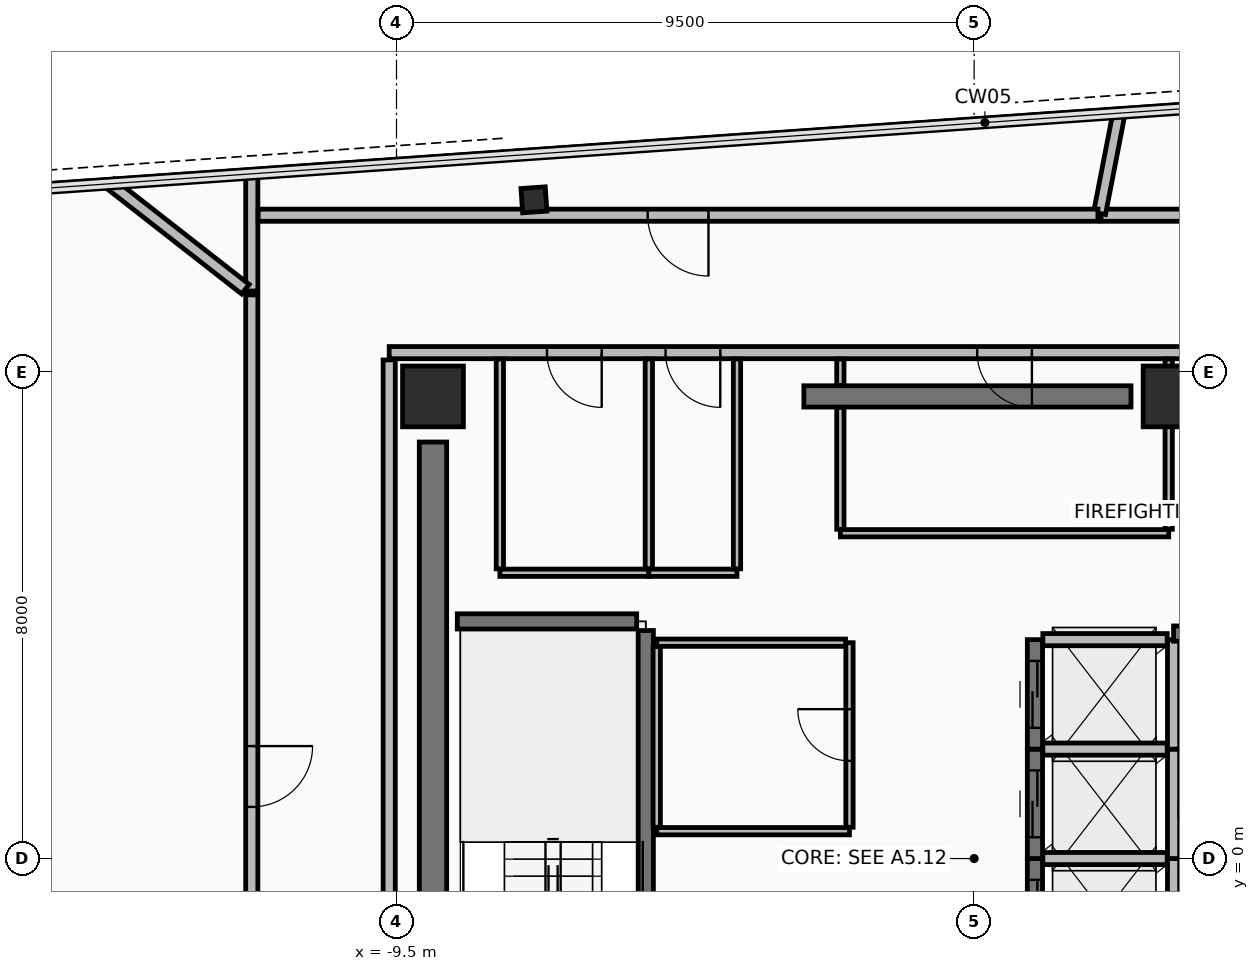
"""IFC4 building model, lengths in metres.
Left out: names, types, materials, properties, quantities, classifications, styles, units other than length and angle.
Written with IfcOpenShell. Run it as: python <this file> out.ifc"""

import sys

from ifc_helpers import new_model, si_unit, direction, frame, frame_2d, origin, origin_2d, place, context, subcontext, project, spatial, rectangle, hollow_rectangle, extrude, element, fill, save


model = new_model("IFC4")
c1 = context("Model", 3, precision=1e-05, world=origin(), true_north=direction((0.0, 1.0)))
c2 = subcontext(c1, "Body", "Model", "MODEL_VIEW")
j1 = project(units=[si_unit("LENGTHUNIT", "METRE"), si_unit("PLANEANGLEUNIT", "RADIAN")], contexts=[c1])
p1 = place(None, origin())
s1 = spatial("IfcSite", under=j1, at=p1, CompositionType="ELEMENT")
p2 = place(p1, origin())
s2 = spatial("IfcBuilding", under=s1, at=p2, CompositionType="ELEMENT")
p3 = place(p2, frame((0.0, 0.0, 267.8)))
s3 = spatial("IfcBuildingStorey", under=s2, at=p3, CompositionType="ELEMENT", Elevation=267.8)
for number, where, z_axis, x_axis in (
    (1, (3.28, 7.6, 0.0), (0.0, 0.0, 1.0), (1.0, 0.0, 0.0)),
    (2, (-8.9, 7.6, 0.0), (0.0, 0.0, 1.0), (1.0, 0.0, 0.0)),
):
    element("IfcColumn", number, at=place(p3, frame(where, z_axis=z_axis, x_axis=x_axis)), inside=s3, PredefinedType="COLUMN", context=c2, shape_type="SweptSolid", body=[
        extrude(rectangle(XDim=1.0, YDim=1.0, at=origin_2d()), origin(), (0.0, 0.0, 1.0), 3.6),
    ])
p4 = place(p3, frame((-7.24, 10.833, 0.0), z_axis=(0.0, 0.0, 1.0), x_axis=(0.99756392851, 0.069758214822, 0.0)))
e3 = element("IfcColumn", 3, at=p4, inside=s3, PredefinedType="COLUMN", context=c2, shape_type="SweptSolid", body=[
    extrude(hollow_rectangle(XDim=0.4, YDim=0.4, WallThickness=0.025, at=origin_2d()), origin(), (0.0, 0.0, 1.0), 3.6),
])
p5 = place(p3, frame((-2.8, 7.6, 0.0), z_axis=(0.0, 0.0, 1.0), x_axis=(1.0, 0.0, 0.0)))
e4 = element("IfcWall", 4, at=p5, inside=s3, PredefinedType="SHEAR", context=c2, shape_type="SweptSolid", body=[
    extrude(rectangle(XDim=5.38, YDim=0.35, at=frame_2d((2.69, 0.0))), origin(), (0.0, 0.0, 1.0), 3.42),
])
p6 = place(p3, frame((-8.9, -3.85, 0.0), z_axis=(0.0, 0.0, 1.0), x_axis=(0.0, 1.0, 0.0)))
e5 = element("IfcWall", 5, at=p6, inside=s3, PredefinedType="SHEAR", context=c2, shape_type="SweptSolid", body=[
    extrude(rectangle(XDim=10.7, YDim=0.45, at=frame_2d((5.35, 0.0))), origin(), (0.0, 0.0, 1.0), 3.42),
])
p7 = place(p3, frame((9.62, 8.32, 0.0), z_axis=(0.0, 0.0, 1.0), x_axis=(-1.0, 0.0, 0.0)))
e6 = element("IfcWall", 6, at=p7, inside=s3, PredefinedType="PARTITIONING", context=c2, shape_type="SweptSolid", body=[
    extrude(rectangle(XDim=19.24, YDim=0.2, at=frame_2d((9.62, 0.0))), origin(), (0.0, 0.0, 1.0), 2.915),
])
p8 = place(p7, frame((8.67, 0.0, 0.0)))
e7 = element("IfcOpeningElement", 7, at=p8, cuts=e6, PredefinedType="OPENING", context=c2, shape_type="SweptSolid", body=[
    extrude(rectangle(XDim=0.9, YDim=2.1, at=frame_2d((0.45, 1.05))), frame((0.0, 0.11, 0.0), z_axis=(0.0, -1.0, 0.0), x_axis=(1.0, 0.0, 0.0)), (0.0, 0.0, 1.0), 0.22),
])
p9 = place(p7, frame((15.745, 0.0, 0.0)))
e8 = element("IfcOpeningElement", 8, at=p9, cuts=e6, PredefinedType="OPENING", context=c2, shape_type="SweptSolid", body=[
    extrude(rectangle(XDim=0.9, YDim=2.1, at=frame_2d((0.45, 1.05))), frame((0.0, 0.11, 0.0), z_axis=(0.0, -1.0, 0.0), x_axis=(1.0, 0.0, 0.0)), (0.0, 0.0, 1.0), 0.22),
])
p10 = place(p7, frame((13.795, 0.0, 0.0)))
e9 = element("IfcOpeningElement", 9, at=p10, cuts=e6, PredefinedType="OPENING", context=c2, shape_type="SweptSolid", body=[
    extrude(rectangle(XDim=0.9, YDim=2.1, at=frame_2d((0.45, 1.05))), frame((0.0, 0.11, 0.0), z_axis=(0.0, -1.0, 0.0), x_axis=(1.0, 0.0, 0.0)), (0.0, 0.0, 1.0), 0.22),
])
p11 = place(p3, frame((-9.62, 8.2, 0.0), z_axis=(0.0, 0.0, 1.0), x_axis=(0.0, -1.0, 0.0)))
e10 = element("IfcWall", 10, at=p11, inside=s3, PredefinedType="PARTITIONING", context=c2, shape_type="SweptSolid", body=[
    extrude(rectangle(XDim=16.4, YDim=0.2, at=frame_2d((8.2, 0.0))), origin(), (0.0, 0.0, 1.0), 2.765),
])
p12 = place(p11, frame((12.65, 0.0, 0.0)))
e11 = element("IfcOpeningElement", 11, at=p12, cuts=e10, PredefinedType="OPENING", context=c2, shape_type="SweptSolid", body=[
    extrude(rectangle(XDim=1.1, YDim=2.15, at=frame_2d((0.55, 1.075))), frame((0.0, 0.11, 0.0), z_axis=(0.0, -1.0, 0.0), x_axis=(1.0, 0.0, 0.0)), (0.0, 0.0, 1.0), 0.22),
])
p13 = place(p3, frame((-5.4, -3.55, 0.0), z_axis=(0.0, 0.0, 1.0), x_axis=(0.0, 1.0, 0.0)))
e12 = element("IfcWall", 12, at=p13, inside=s3, PredefinedType="SHEAR", context=c2, shape_type="SweptSolid", body=[
    extrude(rectangle(XDim=7.3, YDim=0.25, at=frame_2d((3.65, 0.0))), origin(), (0.0, 0.0, 1.0), 3.42),
])
p14 = place(p3, frame((-8.5, 3.9, 0.0), z_axis=(0.0, 0.0, 1.0), x_axis=(1.0, 0.0, 0.0)))
e13 = element("IfcWall", 13, at=p14, inside=s3, PredefinedType="SHEAR", context=c2, shape_type="SweptSolid", body=[
    extrude(rectangle(XDim=2.95, YDim=0.25, at=frame_2d((1.475, 0.0))), origin(), (0.0, 0.0, 1.0), 3.42),
])
p15 = place(p3, frame((1.0, -1.8, 0.0), z_axis=(0.0, 0.0, 1.0), x_axis=(0.0, 1.0, 0.0)))
e14 = element("IfcWall", 14, at=p15, inside=s3, PredefinedType="SHEAR", context=c2, shape_type="SweptSolid", body=[
    extrude(rectangle(XDim=1.8, YDim=0.25, at=frame_2d((0.9, 0.0))), origin(), (0.0, 0.0, 1.0), 3.42),
])
p16 = place(p15, frame((0.35, 0.0, 0.0)))
e15 = element("IfcOpeningElement", 15, at=p16, cuts=e14, PredefinedType="OPENING", context=c2, shape_type="SweptSolid", body=[
    extrude(rectangle(XDim=1.1, YDim=2.2, at=frame_2d((0.55, 1.1))), frame((0.0, 0.135, 0.0), z_axis=(0.0, -1.0, 0.0), x_axis=(1.0, 0.0, 0.0)), (0.0, 0.0, 1.0), 0.27),
])
p17 = place(p3, frame((3.28, -1.8, 0.0), z_axis=(0.0, 0.0, 1.0), x_axis=(0.0, 1.0, 0.0)))
e16 = element("IfcWall", 16, at=p17, inside=s3, PredefinedType="PARTITIONING", context=c2, shape_type="SweptSolid", body=[
    extrude(rectangle(XDim=1.8, YDim=0.2, at=frame_2d((0.9, 0.0))), origin(), (0.0, 0.0, 1.0), 3.42),
])
p18 = place(p3, frame((1.13, 0.0, 0.0), z_axis=(0.0, 0.0, 1.0), x_axis=(1.0, 0.0, 0.0)))
e17 = element("IfcWall", 17, at=p18, inside=s3, PredefinedType="PARTITIONING", context=c2, shape_type="SweptSolid", body=[
    extrude(rectangle(XDim=2.045, YDim=0.2, at=frame_2d((1.022, 0.0))), origin(), (0.0, 0.0, 1.0), 3.42),
])
p19 = place(p3, frame((1.0, 0.0, 0.0), z_axis=(0.0, 0.0, 1.0), x_axis=(0.0, 1.0, 0.0)))
e18 = element("IfcWall", 18, at=p19, inside=s3, PredefinedType="SHEAR", context=c2, shape_type="SweptSolid", body=[
    extrude(rectangle(XDim=1.8, YDim=0.25, at=frame_2d((0.9, 0.0))), origin(), (0.0, 0.0, 1.0), 3.42),
])
p20 = place(p19, frame((0.35, 0.0, 0.0)))
e19 = element("IfcOpeningElement", 19, at=p20, cuts=e18, PredefinedType="OPENING", context=c2, shape_type="SweptSolid", body=[
    extrude(rectangle(XDim=1.1, YDim=2.2, at=frame_2d((0.55, 1.1))), frame((0.0, 0.135, 0.0), z_axis=(0.0, -1.0, 0.0), x_axis=(1.0, 0.0, 0.0)), (0.0, 0.0, 1.0), 0.27),
])
p21 = place(p3, frame((3.28, 0.0, 0.0), z_axis=(0.0, 0.0, 1.0), x_axis=(0.0, 1.0, 0.0)))
e20 = element("IfcWall", 20, at=p21, inside=s3, PredefinedType="PARTITIONING", context=c2, shape_type="SweptSolid", body=[
    extrude(rectangle(XDim=1.8, YDim=0.2, at=frame_2d((0.9, 0.0))), origin(), (0.0, 0.0, 1.0), 3.42),
])
p22 = place(p3, frame((1.13, 1.8, 0.0), z_axis=(0.0, 0.0, 1.0), x_axis=(1.0, 0.0, 0.0)))
e21 = element("IfcWall", 21, at=p22, inside=s3, PredefinedType="PARTITIONING", context=c2, shape_type="SweptSolid", body=[
    extrude(rectangle(XDim=2.045, YDim=0.2, at=frame_2d((1.022, 0.0))), origin(), (0.0, 0.0, 1.0), 3.42),
])
p23 = place(p3, frame((1.0, 1.8, 0.0), z_axis=(0.0, 0.0, 1.0), x_axis=(0.0, 1.0, 0.0)))
e22 = element("IfcWall", 22, at=p23, inside=s3, PredefinedType="SHEAR", context=c2, shape_type="SweptSolid", body=[
    extrude(rectangle(XDim=1.8, YDim=0.25, at=frame_2d((0.9, 0.0))), origin(), (0.0, 0.0, 1.0), 3.42),
])
p24 = place(p23, frame((0.35, 0.0, 0.0)))
e23 = element("IfcOpeningElement", 23, at=p24, cuts=e22, PredefinedType="OPENING", context=c2, shape_type="SweptSolid", body=[
    extrude(rectangle(XDim=1.1, YDim=2.2, at=frame_2d((0.55, 1.1))), frame((0.0, 0.135, 0.0), z_axis=(0.0, -1.0, 0.0), x_axis=(1.0, 0.0, 0.0)), (0.0, 0.0, 1.0), 0.27),
])
p25 = place(p3, frame((3.28, 1.8, 0.0), z_axis=(0.0, 0.0, 1.0), x_axis=(0.0, 1.0, 0.0)))
e24 = element("IfcWall", 24, at=p25, inside=s3, PredefinedType="PARTITIONING", context=c2, shape_type="SweptSolid", body=[
    extrude(rectangle(XDim=1.8, YDim=0.2, at=frame_2d((0.9, 0.0))), origin(), (0.0, 0.0, 1.0), 3.42),
])
p26 = place(p3, frame((1.13, 3.6, 0.0), z_axis=(0.0, 0.0, 1.0), x_axis=(1.0, 0.0, 0.0)))
e25 = element("IfcWall", 25, at=p26, inside=s3, PredefinedType="PARTITIONING", context=c2, shape_type="SweptSolid", body=[
    extrude(rectangle(XDim=2.045, YDim=0.2, at=frame_2d((1.022, 0.0))), origin(), (0.0, 0.0, 1.0), 2.715),
])
p27 = place(p3, frame((3.28, 3.7, 0.0), z_axis=(0.0, 0.0, 1.0), x_axis=(1.0, 0.0, 0.0)))
e26 = element("IfcWall", 26, at=p27, inside=s3, PredefinedType="SHEAR", context=c2, shape_type="SweptSolid", body=[
    extrude(rectangle(XDim=2.07, YDim=0.25, at=frame_2d((1.035, 0.0))), origin(), (0.0, 0.0, 1.0), 3.42),
])
p28 = place(p27, frame((0.435, 0.0, 0.0)))
e27 = element("IfcOpeningElement", 27, at=p28, cuts=e26, PredefinedType="OPENING", context=c2, shape_type="SweptSolid", body=[
    extrude(rectangle(XDim=1.2, YDim=2.2, at=frame_2d((0.6, 1.1))), frame((0.0, 0.135, 0.0), z_axis=(0.0, -1.0, 0.0), x_axis=(1.0, 0.0, 0.0)), (0.0, 0.0, 1.0), 0.27),
])
p29 = place(p3, frame((-5.22, 0.45, 0.0), z_axis=(0.0, 0.0, 1.0), x_axis=(1.0, 0.0, 0.0)))
e28 = element("IfcWall", 28, at=p29, inside=s3, PredefinedType="PARTITIONING", context=c2, shape_type="SweptSolid", body=[
    extrude(rectangle(XDim=3.17, YDim=0.12, at=frame_2d((1.585, 0.0))), origin(), (0.0, 0.0, 1.0), 3.42),
])
p30 = place(p3, frame((-2.05, 0.515, 0.0), z_axis=(0.0, 0.0, 1.0), x_axis=(0.0, 1.0, 0.0)))
e29 = element("IfcWall", 29, at=p30, inside=s3, PredefinedType="PARTITIONING", context=c2, shape_type="SweptSolid", body=[
    extrude(rectangle(XDim=3.035, YDim=0.12, at=frame_2d((1.518, 0.0))), origin(), (0.0, 0.0, 1.0), 3.42),
])
p31 = place(p30, frame((1.092, 0.0, 0.0)))
e30 = element("IfcOpeningElement", 30, at=p31, cuts=e29, PredefinedType="OPENING", context=c2, shape_type="SweptSolid", body=[
    extrude(rectangle(XDim=0.85, YDim=2.1, at=frame_2d((0.425, 1.05))), frame((0.0, 0.07, 0.0), z_axis=(0.0, -1.0, 0.0), x_axis=(1.0, 0.0, 0.0)), (0.0, 0.0, 1.0), 0.14),
])
p32 = place(p3, frame((-2.115, 3.55, 0.0), z_axis=(0.0, 0.0, 1.0), x_axis=(-1.0, 0.0, 0.0)))
e31 = element("IfcWall", 31, at=p32, inside=s3, PredefinedType="PARTITIONING", context=c2, shape_type="SweptSolid", body=[
    extrude(rectangle(XDim=3.105, YDim=0.12, at=frame_2d((1.552, 0.0))), origin(), (0.0, 0.0, 1.0), 3.42),
])
p33 = place(p3, frame((-5.22, 3.485, 0.0), z_axis=(0.0, 0.0, 1.0), x_axis=(0.0, -1.0, 0.0)))
e32 = element("IfcWall", 32, at=p33, inside=s3, PredefinedType="PARTITIONING", context=c2, shape_type="SweptSolid", body=[
    extrude(rectangle(XDim=2.97, YDim=0.12, at=frame_2d((1.485, 0.0))), origin(), (0.0, 0.0, 1.0), 3.42),
])
p34 = place(p3, frame((-2.2, 5.35, 0.0), z_axis=(0.0, 0.0, 1.0), x_axis=(1.0, 0.0, 0.0)))
e33 = element("IfcWall", 33, at=p34, inside=s3, PredefinedType="PARTITIONING", context=c2, shape_type="SweptSolid", body=[
    extrude(rectangle(XDim=5.4, YDim=0.12, at=frame_2d((2.7, 0.0))), origin(), (0.0, 0.0, 1.0), 2.715),
])
p35 = place(p3, frame((3.2, 5.415, 0.0), z_axis=(0.0, 0.0, 1.0), x_axis=(0.0, 1.0, 0.0)))
e34 = element("IfcWall", 34, at=p35, inside=s3, PredefinedType="PARTITIONING", context=c2, shape_type="SweptSolid", body=[
    extrude(rectangle(XDim=2.8, YDim=0.12, at=frame_2d((1.4, 0.0))), origin(), (0.0, 0.0, 1.0), 2.715),
])
p36 = place(p3, frame((-2.2, 8.215, 0.0), z_axis=(0.0, 0.0, 1.0), x_axis=(0.0, -1.0, 0.0)))
e35 = element("IfcWall", 35, at=p36, inside=s3, PredefinedType="PARTITIONING", context=c2, shape_type="SweptSolid", body=[
    extrude(rectangle(XDim=0.435, YDim=0.12, at=frame_2d((0.218, 0.0))), origin(), (0.0, 0.0, 1.0), 2.715),
])
p37 = place(p3, frame((-2.2, 7.42, 0.0), z_axis=(0.0, 0.0, 1.0), x_axis=(0.0, -1.0, 0.0)))
e36 = element("IfcWall", 36, at=p37, inside=s3, PredefinedType="PARTITIONING", context=c2, shape_type="SweptSolid", body=[
    extrude(rectangle(XDim=2.005, YDim=0.12, at=frame_2d((1.002, 0.0))), origin(), (0.0, 0.0, 1.0), 2.715),
])
p38 = place(p3, frame((-7.8, 4.7, 0.0), z_axis=(0.0, 0.0, 1.0), x_axis=(1.0, 0.0, 0.0)))
e37 = element("IfcWall", 37, at=p38, inside=s3, PredefinedType="PARTITIONING", context=c2, shape_type="SweptSolid", body=[
    extrude(rectangle(XDim=2.45, YDim=0.12, at=frame_2d((1.225, 0.0))), origin(), (0.0, 0.0, 1.0), 3.42),
])
for number, where, z_axis, x_axis in (
    (38, (-5.35, 4.765, 0.0), (0.0, 0.0, 1.0), (0.0, 1.0, 0.0)),
    (39, (-7.8, 8.215, 0.0), (0.0, 0.0, 1.0), (0.0, -1.0, 0.0)),
):
    element("IfcWall", number, at=place(p3, frame(where, z_axis=z_axis, x_axis=x_axis)), inside=s3, PredefinedType="PARTITIONING", context=c2, shape_type="SweptSolid", body=[
        extrude(rectangle(XDim=3.45, YDim=0.12, at=frame_2d((1.725, 0.0))), origin(), (0.0, 0.0, 1.0), 2.715),
    ])
p39 = place(p3, frame((-5.35, 4.7, 0.0), z_axis=(0.0, 0.0, 1.0), x_axis=(1.0, 0.0, 0.0)))
e40 = element("IfcWall", 40, at=p39, inside=s3, PredefinedType="PARTITIONING", context=c2, shape_type="SweptSolid", body=[
    extrude(rectangle(XDim=1.45, YDim=0.12, at=frame_2d((0.725, 0.0))), origin(), (0.0, 0.0, 1.0), 3.42),
])
p40 = place(p3, frame((-3.9, 4.765, 0.0), z_axis=(0.0, 0.0, 1.0), x_axis=(0.0, 1.0, 0.0)))
e41 = element("IfcWall", 41, at=p40, inside=s3, PredefinedType="PARTITIONING", context=c2, shape_type="SweptSolid", body=[
    extrude(rectangle(XDim=3.45, YDim=0.12, at=frame_2d((1.725, 0.0))), origin(), (0.0, 0.0, 1.0), 2.715),
])
p41 = place(p3, frame((11.879, 10.58, 0.0), z_axis=(0.0, 0.0, 1.0), x_axis=(-1.0, 0.0, 0.0)))
e42 = element("IfcWall", 42, at=p41, inside=s3, PredefinedType="PARTITIONING", context=c2, shape_type="SweptSolid", body=[
    extrude(rectangle(XDim=9.792, YDim=0.2, at=frame_2d((4.896, 0.0))), origin(), (0.0, 0.0, 1.0), 2.915),
])
p42 = place(p41, frame((5.296, 0.0, 0.0)))
e43 = element("IfcOpeningElement", 43, at=p42, cuts=e42, PredefinedType="OPENING", context=c2, shape_type="SweptSolid", body=[
    extrude(rectangle(XDim=1.0, YDim=2.15, at=frame_2d((0.5, 1.075))), frame((0.0, 0.11, 0.0), z_axis=(0.0, -1.0, 0.0), x_axis=(1.0, 0.0, 0.0)), (0.0, 0.0, 1.0), 0.22),
])
p43 = place(p3, frame((2.062, 10.61, 0.0), z_axis=(0.0, 0.0, 1.0), x_axis=(0.190794848405, 0.981629933235, 0.0)))
e44 = element("IfcWall", 44, at=p43, inside=s3, PredefinedType="PARTITIONING", context=c2, shape_type="SweptSolid", body=[
    extrude(rectangle(XDim=1.66, YDim=0.2, at=frame_2d((0.83, 0.0))), origin(), (0.0, 0.0, 1.0), 2.765),
])
p44 = place(p3, frame((-11.88, 11.26, 0.0), z_axis=(0.0, 0.0, 1.0), x_axis=(0.0, -1.0, 0.0)))
e45 = element("IfcWall", 45, at=p44, inside=s3, PredefinedType="PARTITIONING", context=c2, shape_type="SweptSolid", body=[
    extrude(rectangle(XDim=1.927, YDim=0.2, at=frame_2d((0.964, 0.0))), origin(), (0.0, 0.0, 1.0), 2.765),
])
p45 = place(p3, frame((-11.985, 9.364, 0.0), z_axis=(0.0, 0.0, 1.0), x_axis=(-0.787996776596, 0.615679364664, 0.0)))
e46 = element("IfcWall", 46, at=p45, inside=s3, PredefinedType="PARTITIONING", context=c2, shape_type="SweptSolid", body=[
    extrude(rectangle(XDim=2.817, YDim=0.2, at=frame_2d((1.408, 0.0))), origin(), (0.0, 0.0, 1.0), 2.765),
])
p46 = place(p3, frame((2.036, 10.58, 0.0), z_axis=(0.0, 0.0, 1.0), x_axis=(-1.0, 0.0, 0.0)))
e47 = element("IfcWall", 47, at=p46, inside=s3, PredefinedType="PARTITIONING", context=c2, shape_type="SweptSolid", body=[
    extrude(rectangle(XDim=13.811, YDim=0.2, at=frame_2d((6.905, 0.0))), origin(), (0.0, 0.0, 1.0), 2.765),
])
p47 = place(p46, frame((6.405, 0.0, 0.0)))
e48 = element("IfcOpeningElement", 48, at=p47, cuts=e47, PredefinedType="OPENING", context=c2, shape_type="SweptSolid", body=[
    extrude(rectangle(XDim=1.0, YDim=2.15, at=frame_2d((0.5, 1.075))), frame((0.0, 0.11, 0.0), z_axis=(0.0, -1.0, 0.0), x_axis=(1.0, 0.0, 0.0)), (0.0, 0.0, 1.0), 0.22),
])
p48 = place(p3, frame((-11.88, 9.27, 0.0), z_axis=(0.0, 0.0, 1.0), x_axis=(0.0, -1.0, 0.0)))
e49 = element("IfcWall", 49, at=p48, inside=s3, PredefinedType="PARTITIONING", context=c2, shape_type="SweptSolid", body=[
    extrude(rectangle(XDim=15.84, YDim=0.2, at=frame_2d((7.92, 0.0))), origin(), (0.0, 0.0, 1.0), 2.765),
])
p49 = place(p48, frame((7.42, 0.0, 0.0)))
e50 = element("IfcOpeningElement", 50, at=p49, cuts=e49, PredefinedType="OPENING", context=c2, shape_type="SweptSolid", body=[
    extrude(rectangle(XDim=1.0, YDim=2.15, at=frame_2d((0.5, 1.075))), frame((0.0, 0.11, 0.0), z_axis=(0.0, -1.0, 0.0), x_axis=(1.0, 0.0, 0.0)), (0.0, 0.0, 1.0), 0.22),
])
p50 = place(p16, origin())
e51 = element("IfcDoor", 51, at=p50, inside=s3, OperationType="SLIDING_TO_LEFT", PredefinedType="DOOR", context=c2, shape_type="SweptSolid", body=[
    extrude(rectangle(XDim=1.1, YDim=2.2, at=frame_2d((0.55, 1.1))), frame((0.0, 0.025, 0.0), z_axis=(0.0, -1.0, 0.0), x_axis=(1.0, 0.0, 0.0)), (0.0, 0.0, 1.0), 0.05),
])
fill(e15, e51)
p51 = place(p20, origin())
e52 = element("IfcDoor", 52, at=p51, inside=s3, OperationType="SLIDING_TO_LEFT", PredefinedType="DOOR", context=c2, shape_type="SweptSolid", body=[
    extrude(rectangle(XDim=1.1, YDim=2.2, at=frame_2d((0.55, 1.1))), frame((0.0, 0.025, 0.0), z_axis=(0.0, -1.0, 0.0), x_axis=(1.0, 0.0, 0.0)), (0.0, 0.0, 1.0), 0.05),
])
fill(e19, e52)
p52 = place(p24, origin())
e53 = element("IfcDoor", 53, at=p52, inside=s3, OperationType="SLIDING_TO_LEFT", PredefinedType="DOOR", context=c2, shape_type="SweptSolid", body=[
    extrude(rectangle(XDim=1.1, YDim=2.2, at=frame_2d((0.55, 1.1))), frame((0.0, 0.025, 0.0), z_axis=(0.0, -1.0, 0.0), x_axis=(1.0, 0.0, 0.0)), (0.0, 0.0, 1.0), 0.05),
])
fill(e23, e53)
p53 = place(p31, frame((0.85, 0.0, 0.0), z_axis=(0.0, 0.0, 1.0), x_axis=(-1.0, 0.0, 0.0)))
e54 = element("IfcDoor", 54, at=p53, inside=s3, OperationType="SINGLE_SWING_RIGHT", PredefinedType="DOOR", context=c2, shape_type="SweptSolid", body=[
    extrude(rectangle(XDim=0.85, YDim=2.1, at=frame_2d((0.425, 1.05))), frame((0.0, 0.025, 0.0), z_axis=(0.0, -1.0, 0.0), x_axis=(1.0, 0.0, 0.0)), (0.0, 0.0, 1.0), 0.05),
])
fill(e30, e54)
p54 = place(p8, origin())
e55 = element("IfcDoor", 55, at=p54, inside=s3, OperationType="SINGLE_SWING_LEFT", PredefinedType="DOOR", context=c2, shape_type="SweptSolid", body=[
    extrude(rectangle(XDim=0.9, YDim=2.1, at=frame_2d((0.45, 1.05))), frame((0.0, 0.025, 0.0), z_axis=(0.0, -1.0, 0.0), x_axis=(1.0, 0.0, 0.0)), (0.0, 0.0, 1.0), 0.05),
])
fill(e7, e55)
p55 = place(p9, origin())
e56 = element("IfcDoor", 56, at=p55, inside=s3, OperationType="SINGLE_SWING_LEFT", PredefinedType="DOOR", context=c2, shape_type="SweptSolid", body=[
    extrude(rectangle(XDim=0.9, YDim=2.1, at=frame_2d((0.45, 1.05))), frame((0.0, 0.025, 0.0), z_axis=(0.0, -1.0, 0.0), x_axis=(1.0, 0.0, 0.0)), (0.0, 0.0, 1.0), 0.05),
])
fill(e8, e56)
p56 = place(p10, origin())
e57 = element("IfcDoor", 57, at=p56, inside=s3, OperationType="SINGLE_SWING_LEFT", PredefinedType="DOOR", context=c2, shape_type="SweptSolid", body=[
    extrude(rectangle(XDim=0.9, YDim=2.1, at=frame_2d((0.45, 1.05))), frame((0.0, 0.025, 0.0), z_axis=(0.0, -1.0, 0.0), x_axis=(1.0, 0.0, 0.0)), (0.0, 0.0, 1.0), 0.05),
])
fill(e9, e57)
p57 = place(p47, origin())
e58 = element("IfcDoor", 58, at=p57, inside=s3, OperationType="SINGLE_SWING_RIGHT", PredefinedType="DOOR", context=c2, shape_type="SweptSolid", body=[
    extrude(rectangle(XDim=1.0, YDim=2.15, at=frame_2d((0.5, 1.075))), frame((0.0, 0.025, 0.0), z_axis=(0.0, -1.0, 0.0), x_axis=(1.0, 0.0, 0.0)), (0.0, 0.0, 1.0), 0.05),
])
fill(e48, e58)
p58 = place(p49, origin())
e59 = element("IfcDoor", 59, at=p58, inside=s3, OperationType="SINGLE_SWING_RIGHT", PredefinedType="DOOR", context=c2, shape_type="SweptSolid", body=[
    extrude(rectangle(XDim=1.0, YDim=2.15, at=frame_2d((0.5, 1.075))), frame((0.0, 0.025, 0.0), z_axis=(0.0, -1.0, 0.0), x_axis=(1.0, 0.0, 0.0)), (0.0, 0.0, 1.0), 0.05),
])
fill(e50, e59)
save(model, sys.argv[1])
